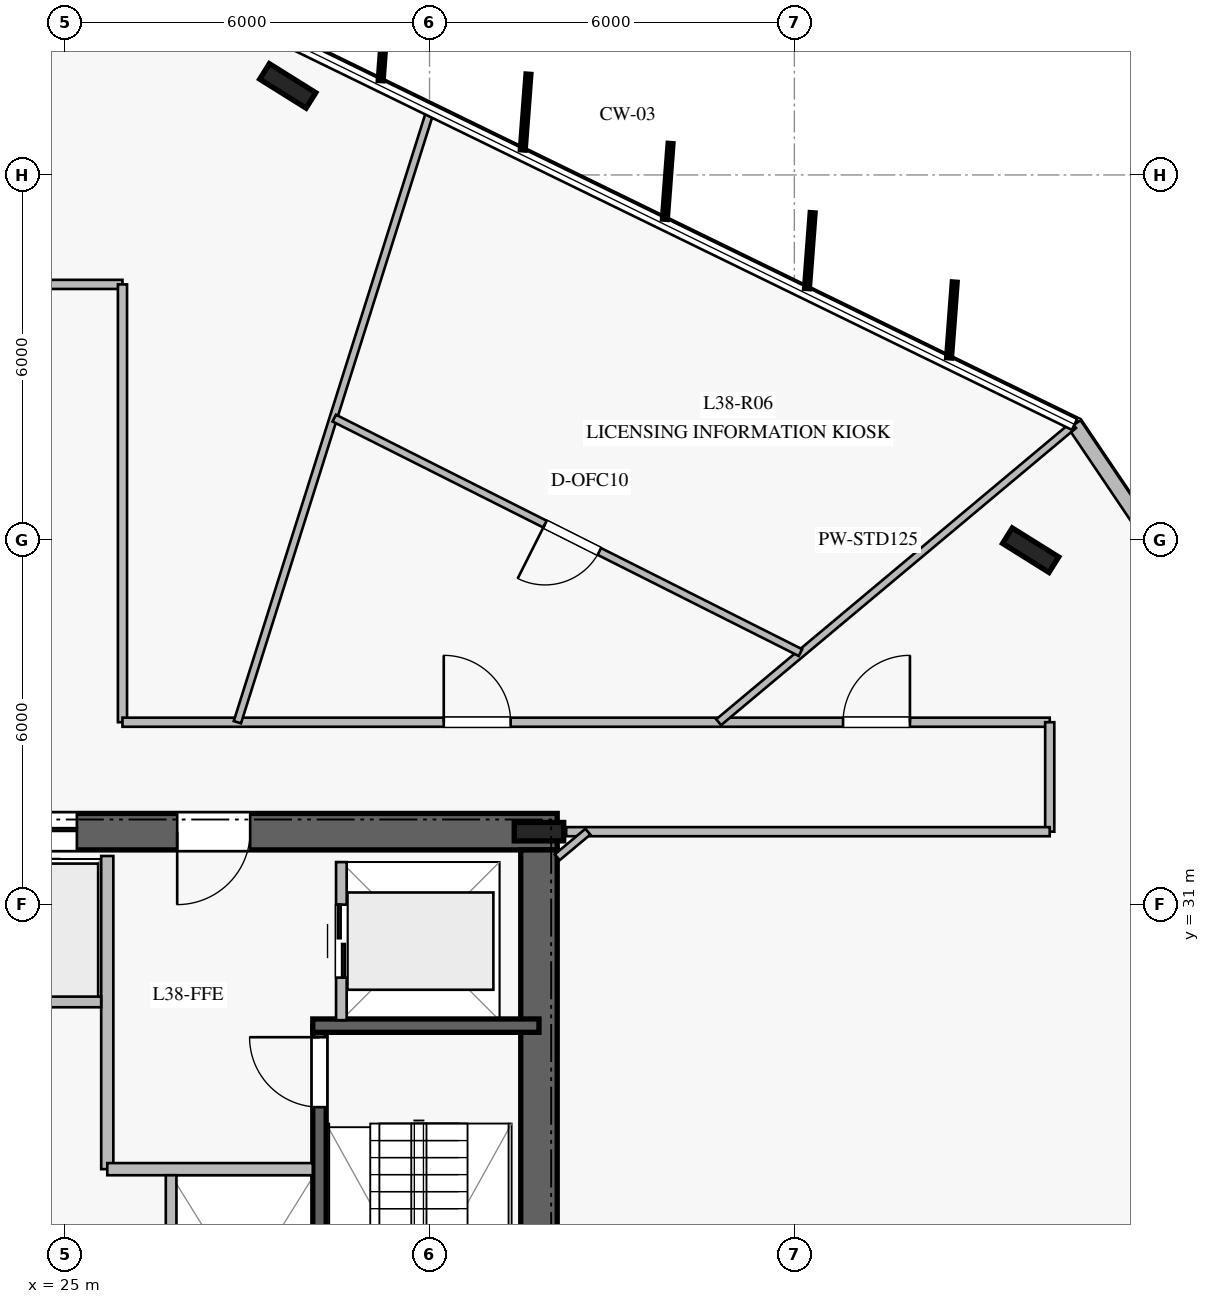
"""IFC4 building model, lengths in metres.
Left out: names, types, materials, properties, quantities, classifications, styles, units other than length and angle.
Written with IfcOpenShell. Run it as: python <this file> out.ifc"""

import sys

from ifc_helpers import new_model, si_unit, direction, frame, frame_2d, origin, origin_2d, place, context, subcontext, project, spatial, rectangle, i_section, extrude, element, fill, save


model = new_model("IFC4")
c1 = context("Model", 3, precision=1e-05, world=origin(), true_north=direction((0.0, 1.0)))
c2 = subcontext(c1, "Body", "Model", "MODEL_VIEW")
j1 = project(units=[si_unit("LENGTHUNIT", "METRE"), si_unit("PLANEANGLEUNIT", "RADIAN")], contexts=[c1])
p1 = place(None, origin())
s1 = spatial("IfcSite", under=j1, at=p1, CompositionType="ELEMENT")
p2 = place(p1, origin())
s2 = spatial("IfcBuilding", under=s1, at=p2, CompositionType="ELEMENT")
p3 = place(p2, frame((0.0, 0.0, 158.4)))
s3 = spatial("IfcBuildingStorey", under=s2, at=p3, CompositionType="ELEMENT", Elevation=158.4)
p4 = place(p3, frame((33.1, 32.2, 0.0), z_axis=(0.0, 0.0, 1.0), x_axis=(-1.0, 0.0, 0.0)))
e1 = element("IfcWall", 1, at=p4, inside=s3, PredefinedType="SHEAR", context=c2, shape_type="SweptSolid", body=[
    extrude(rectangle(XDim=16.2, YDim=0.6, at=frame_2d((8.1, 0.0))), origin(), (0.0, 0.0, 1.0), 3.76),
])
p5 = place(p4, frame((5.05, 0.0, 0.0)))
e2 = element("IfcOpeningElement", 2, at=p5, cuts=e1, PredefinedType="OPENING", context=c2, shape_type="SweptSolid", body=[
    extrude(rectangle(XDim=1.2, YDim=2.25, at=frame_2d((0.6, 1.125))), frame((0.0, 0.31, 0.0), z_axis=(0.0, -1.0, 0.0), x_axis=(1.0, 0.0, 0.0)), (0.0, 0.0, 1.0), 0.62),
])
p6 = place(p4, frame((11.85, 0.0, 0.0)))
e3 = element("IfcOpeningElement", 3, at=p6, cuts=e1, PredefinedType="OPENING", context=c2, shape_type="SweptSolid", body=[
    extrude(rectangle(XDim=1.1, YDim=2.2, at=frame_2d((0.55, 1.1))), frame((0.0, 0.31, 0.0), z_axis=(0.0, -1.0, 0.0), x_axis=(1.0, 0.0, 0.0)), (0.0, 0.0, 1.0), 0.62),
])
p7 = place(p4, frame((9.875, 0.0, 0.0)))
e4 = element("IfcOpeningElement", 4, at=p7, cuts=e1, PredefinedType="OPENING", context=c2, shape_type="SweptSolid", body=[
    extrude(rectangle(XDim=1.1, YDim=2.2, at=frame_2d((0.55, 1.1))), frame((0.0, 0.31, 0.0), z_axis=(0.0, -1.0, 0.0), x_axis=(1.0, 0.0, 0.0)), (0.0, 0.0, 1.0), 0.62),
])
p8 = place(p4, frame((7.9, 0.0, 0.0)))
e5 = element("IfcOpeningElement", 5, at=p8, cuts=e1, PredefinedType="OPENING", context=c2, shape_type="SweptSolid", body=[
    extrude(rectangle(XDim=1.1, YDim=2.2, at=frame_2d((0.55, 1.1))), frame((0.0, 0.31, 0.0), z_axis=(0.0, -1.0, 0.0), x_axis=(1.0, 0.0, 0.0)), (0.0, 0.0, 1.0), 0.62),
])
p9 = place(p3, frame((32.8, 18.1, 0.0), z_axis=(0.0, 0.0, 1.0), x_axis=(0.0, 1.0, 0.0)))
e6 = element("IfcWall", 6, at=p9, inside=s3, PredefinedType="SHEAR", context=c2, shape_type="SweptSolid", body=[
    extrude(rectangle(XDim=13.8, YDim=0.6, at=frame_2d((6.9, 0.0))), origin(), (0.0, 0.0, 1.0), 3.76),
])
p10 = place(p3, frame((32.8, 32.2, 0.0), z_axis=(0.0, 0.0, 1.0), x_axis=(1.0, 0.0, 0.0)))
e7 = element("IfcColumn", 7, at=p10, inside=s3, PredefinedType="COLUMN", context=c2, shape_type="SweptSolid", body=[
    extrude(i_section(OverallWidth=0.303, OverallDepth=0.814, WebThickness=0.021, FlangeThickness=0.04, at=origin_2d()), origin(), (0.0, 0.0, 1.0), 4.0),
])
p11 = place(p3, frame((29.19, 21.79, 0.0), z_axis=(0.0, 0.0, 1.0), x_axis=(0.0, 1.0, 0.0)))
e8 = element("IfcWall", 8, at=p11, inside=s3, PredefinedType="SOLIDWALL", context=c2, shape_type="SweptSolid", body=[
    extrude(rectangle(XDim=7.22, YDim=0.22, at=frame_2d((3.61, 0.0))), origin(), (0.0, 0.0, 1.0), 3.76),
])
p12 = place(p11, frame((5.88, 0.0, 0.0)))
e9 = element("IfcOpeningElement", 9, at=p12, cuts=e8, PredefinedType="OPENING", context=c2, shape_type="SweptSolid", body=[
    extrude(rectangle(XDim=1.15, YDim=2.2, at=frame_2d((0.575, 1.1))), frame((0.0, 0.12, 0.0), z_axis=(0.0, -1.0, 0.0), x_axis=(1.0, 0.0, 0.0)), (0.0, 0.0, 1.0), 0.24),
])
p13 = place(p3, frame((29.08, 29.01, 0.0), z_axis=(0.0, 0.0, 1.0), x_axis=(1.0, 0.0, 0.0)))
e10 = element("IfcWall", 10, at=p13, inside=s3, PredefinedType="SOLIDWALL", context=c2, shape_type="SweptSolid", body=[
    extrude(rectangle(XDim=3.72, YDim=0.22, at=frame_2d((1.86, 0.0))), origin(), (0.0, 0.0, 1.0), 3.76),
])
for number, where, z_axis, x_axis in (
    (11, (40.886, 36.829, 0.0), (0.0, 0.0, 1.0), (-0.848, 0.53, 0.0)),
    (12, (28.668, 44.464, 0.0), (0.0, 0.0, 1.0), (-0.848, 0.53, 0.0)),
):
    element("IfcColumn", number, at=place(p3, frame(where, z_axis=z_axis, x_axis=x_axis)), inside=s3, PredefinedType="COLUMN", context=c2, shape_type="SweptSolid", body=[
        extrude(i_section(OverallWidth=0.3, OverallDepth=0.9, WebThickness=0.019, FlangeThickness=0.035, at=origin_2d()), origin(), (0.0, 0.0, 1.0), 4.0),
    ])
p14 = place(p3, frame((44.107, 35.192, 0.0), z_axis=(0.0, 0.0, 1.0), x_axis=(-0.559078804203, 0.82911452206, 0.0)))
e13 = element("IfcWall", 13, at=p14, inside=s3, PredefinedType="STANDARD", context=c2, shape_type="SweptSolid", body=[
    extrude(rectangle(XDim=4.47, YDim=0.24, at=frame_2d((2.235, 0.0))), origin(), (0.0, 0.0, 1.0), 3.76),
])
p15 = place(p3, frame((25.7, 26.65, 0.0), z_axis=(0.0, 0.0, 1.0), x_axis=(0.0, 1.0, 0.0)))
e14 = element("IfcWall", 14, at=p15, inside=s3, PredefinedType="PARTITIONING", context=c2, shape_type="SweptSolid", body=[
    extrude(rectangle(XDim=5.15, YDim=0.2, at=frame_2d((2.575, 0.0))), origin(), (0.0, 0.0, 1.0), 3.76),
])
p16 = place(p3, frame((25.7, 26.65, 0.0), z_axis=(0.0, 0.0, 1.0), x_axis=(1.0, 0.0, 0.0)))
e15 = element("IfcWall", 15, at=p16, inside=s3, PredefinedType="PARTITIONING", context=c2, shape_type="SweptSolid", body=[
    extrude(rectangle(XDim=3.38, YDim=0.2, at=frame_2d((1.69, 0.0))), origin(), (0.0, 0.0, 1.0), 3.76),
])
for number, where, z_axis, x_axis in (
    (16, (23.7, 29.4, 0.0), (0.0, 0.0, 1.0), (1.0, 0.0, 0.0)),
    (17, (26.75, 24.65, 0.0), (0.0, 0.0, 1.0), (0.0, 1.0, 0.0)),
):
    element("IfcWall", number, at=place(p3, frame(where, z_axis=z_axis, x_axis=x_axis)), inside=s3, PredefinedType="PARTITIONING", context=c2, shape_type="SweptSolid", body=[
        extrude(rectangle(XDim=1.9, YDim=0.175, at=frame_2d((0.95, 0.0))), origin(), (0.0, 0.0, 1.0), 3.76),
    ])
p17 = place(p3, frame((29.55, 29.1, 0.0), z_axis=(0.0, 0.0, 1.0), x_axis=(0.0, 1.0, 0.0)))
e18 = element("IfcWall", 18, at=p17, inside=s3, PredefinedType="PARTITIONING", context=c2, shape_type="SweptSolid", body=[
    extrude(rectangle(XDim=2.6, YDim=0.175, at=frame_2d((1.3, 0.0))), origin(), (0.0, 0.0, 1.0), 3.76),
])
p18 = place(p17, frame((0.7, 0.0, 0.0)))
e19 = element("IfcOpeningElement", 19, at=p18, cuts=e18, PredefinedType="OPENING", context=c2, shape_type="SweptSolid", body=[
    extrude(rectangle(XDim=1.2, YDim=2.2, at=frame_2d((0.6, 1.1))), frame((0.0, 0.098, 0.0), z_axis=(0.0, -1.0, 0.0), x_axis=(1.0, 0.0, 0.0)), (0.0, 0.0, 1.0), 0.195),
])
p19 = place(p3, frame((24.05, 41.2, 0.0), z_axis=(0.0, 0.0, 1.0), x_axis=(1.0, 0.0, 0.0)))
e20 = element("IfcWall", 20, at=p19, inside=s3, PredefinedType="PARTITIONING", context=c2, shape_type="SweptSolid", body=[
    extrude(rectangle(XDim=1.9, YDim=0.15, at=frame_2d((0.95, 0.0))), origin(), (0.0, 0.0, 1.0), 3.76),
])
p20 = place(p3, frame((25.95, 41.2, 0.0), z_axis=(0.0, 0.0, 1.0), x_axis=(0.0, -1.0, 0.0)))
e21 = element("IfcWall", 21, at=p20, inside=s3, PredefinedType="PARTITIONING", context=c2, shape_type="SweptSolid", body=[
    extrude(rectangle(XDim=7.2, YDim=0.15, at=frame_2d((3.6, 0.0))), origin(), (0.0, 0.0, 1.0), 3.36),
])
p21 = place(p3, frame((25.95, 34.0, 0.0), z_axis=(0.0, 0.0, 1.0), x_axis=(1.0, 0.0, 0.0)))
e22 = element("IfcWall", 22, at=p21, inside=s3, PredefinedType="PARTITIONING", context=c2, shape_type="SweptSolid", body=[
    extrude(rectangle(XDim=15.25, YDim=0.15, at=frame_2d((7.625, 0.0))), origin(), (0.0, 0.0, 1.0), 3.21),
])
p22 = place(p21, frame((11.851, 0.0, 0.0)))
e23 = element("IfcOpeningElement", 23, at=p22, cuts=e22, PredefinedType="OPENING", context=c2, shape_type="SweptSolid", body=[
    extrude(rectangle(XDim=1.1, YDim=2.2, at=frame_2d((0.55, 1.1))), frame((0.0, 0.085, 0.0), z_axis=(0.0, -1.0, 0.0), x_axis=(1.0, 0.0, 0.0)), (0.0, 0.0, 1.0), 0.17),
])
p23 = place(p21, frame((5.284, 0.0, 0.0)))
e24 = element("IfcOpeningElement", 24, at=p23, cuts=e22, PredefinedType="OPENING", context=c2, shape_type="SweptSolid", body=[
    extrude(rectangle(XDim=1.1, YDim=2.2, at=frame_2d((0.55, 1.1))), frame((0.0, 0.085, 0.0), z_axis=(0.0, -1.0, 0.0), x_axis=(1.0, 0.0, 0.0)), (0.0, 0.0, 1.0), 0.17),
])
p24 = place(p3, frame((41.2, 34.0, 0.0), z_axis=(0.0, 0.0, 1.0), x_axis=(0.0, -1.0, 0.0)))
e25 = element("IfcWall", 25, at=p24, inside=s3, PredefinedType="PARTITIONING", context=c2, shape_type="SweptSolid", body=[
    extrude(rectangle(XDim=1.8, YDim=0.15, at=frame_2d((0.9, 0.0))), origin(), (0.0, 0.0, 1.0), 3.76),
])
p25 = place(p3, frame((41.2, 32.2, 0.0), z_axis=(0.0, 0.0, 1.0), x_axis=(-1.0, 0.0, 0.0)))
e26 = element("IfcWall", 26, at=p25, inside=s3, PredefinedType="PARTITIONING", context=c2, shape_type="SweptSolid", body=[
    extrude(rectangle(XDim=7.953, YDim=0.15, at=frame_2d((3.977, 0.0))), origin(), (0.0, 0.0, 1.0), 3.21),
])
p26 = place(p3, frame((33.1, 31.779, 0.0), z_axis=(0.0, 0.0, 1.0), x_axis=(0.76748927859, 0.641061781148, 0.0)))
e27 = element("IfcWall", 27, at=p26, inside=s3, PredefinedType="PARTITIONING", context=c2, shape_type="SweptSolid", body=[
    extrude(rectangle(XDim=0.656, YDim=0.125, at=frame_2d((0.328, 0.0))), origin(), (0.0, 0.0, 1.0), 3.21),
])
p27 = place(p3, frame((35.755, 34.0, 0.0), z_axis=(0.0, 0.0, 1.0), x_axis=(0.766871091206, 0.641801160386, 0.0)))
e28 = element("IfcWall", 28, at=p27, inside=s3, PredefinedType="PARTITIONING", context=c2, shape_type="SweptSolid", body=[
    extrude(rectangle(XDim=7.613, YDim=0.125, at=frame_2d((3.807, 0.0))), origin(), (0.0, 0.0, 1.0), 3.16),
])
p28 = place(p3, frame((27.84, 34.0, 0.0), z_axis=(0.0, 0.0, 1.0), x_axis=(0.300858550785, 0.953668775005, 0.0)))
e29 = element("IfcWall", 29, at=p28, inside=s3, PredefinedType="PARTITIONING", context=c2, shape_type="SweptSolid", body=[
    extrude(rectangle(XDim=10.536, YDim=0.125, at=frame_2d((5.268, 0.0))), origin(), (0.0, 0.0, 1.0), 3.16),
])
p29 = place(p3, frame((37.1, 35.145, 0.0), z_axis=(0.0, 0.0, 1.0), x_axis=(-0.893377857621, 0.449306135628, 0.0)))
e30 = element("IfcWall", 30, at=p29, inside=s3, PredefinedType="PARTITIONING", context=c2, shape_type="SweptSolid", body=[
    extrude(rectangle(XDim=8.582, YDim=0.125, at=frame_2d((4.291, 0.0))), origin(), (0.0, 0.0, 1.0), 3.21),
])
p30 = place(p29, frame((3.702, 0.0, 0.0)))
e31 = element("IfcOpeningElement", 31, at=p30, cuts=e30, PredefinedType="OPENING", context=c2, shape_type="SweptSolid", body=[
    extrude(rectangle(XDim=1.0, YDim=2.15, at=frame_2d((0.5, 1.075))), frame((0.0, 0.073, 0.0), z_axis=(0.0, -1.0, 0.0), x_axis=(1.0, 0.0, 0.0)), (0.0, 0.0, 1.0), 0.145),
])
p31 = place(p12, origin())
e32 = element("IfcDoor", 32, at=p31, inside=s3, OperationType="SINGLE_SWING_RIGHT", PredefinedType="DOOR", context=c2, shape_type="SweptSolid", body=[
    extrude(rectangle(XDim=1.15, YDim=2.2, at=frame_2d((0.575, 1.1))), frame((0.0, 0.025, 0.0), z_axis=(0.0, -1.0, 0.0), x_axis=(1.0, 0.0, 0.0)), (0.0, 0.0, 1.0), 0.05),
])
fill(e9, e32)
p32 = place(p5, origin())
e33 = element("IfcDoor", 33, at=p32, inside=s3, OperationType="SINGLE_SWING_RIGHT", PredefinedType="DOOR", context=c2, shape_type="SweptSolid", body=[
    extrude(rectangle(XDim=1.2, YDim=2.25, at=frame_2d((0.6, 1.125))), frame((0.0, 0.025, 0.0), z_axis=(0.0, -1.0, 0.0), x_axis=(1.0, 0.0, 0.0)), (0.0, 0.0, 1.0), 0.05),
])
fill(e2, e33)
p33 = place(p8, origin())
e34 = element("IfcDoor", 34, at=p33, inside=s3, OperationType="DOUBLE_DOOR_SLIDING", PredefinedType="DOOR", context=c2, shape_type="SweptSolid", body=[
    extrude(rectangle(XDim=1.1, YDim=2.2, at=frame_2d((0.55, 1.1))), frame((0.0, 0.025, 0.0), z_axis=(0.0, -1.0, 0.0), x_axis=(1.0, 0.0, 0.0)), (0.0, 0.0, 1.0), 0.05),
])
fill(e5, e34)
p34 = place(p18, origin())
e35 = element("IfcDoor", 35, at=p34, inside=s3, OperationType="DOUBLE_DOOR_SLIDING", PredefinedType="DOOR", context=c2, shape_type="SweptSolid", body=[
    extrude(rectangle(XDim=1.2, YDim=2.2, at=frame_2d((0.6, 1.1))), frame((0.0, 0.025, 0.0), z_axis=(0.0, -1.0, 0.0), x_axis=(1.0, 0.0, 0.0)), (0.0, 0.0, 1.0), 0.05),
])
fill(e19, e35)
p35 = place(p22, origin())
e36 = element("IfcDoor", 36, at=p35, inside=s3, OperationType="SINGLE_SWING_RIGHT", PredefinedType="DOOR", context=c2, shape_type="SweptSolid", body=[
    extrude(rectangle(XDim=1.1, YDim=2.2, at=frame_2d((0.55, 1.1))), frame((0.0, 0.025, 0.0), z_axis=(0.0, -1.0, 0.0), x_axis=(1.0, 0.0, 0.0)), (0.0, 0.0, 1.0), 0.05),
])
fill(e23, e36)
p36 = place(p23, origin())
e37 = element("IfcDoor", 37, at=p36, inside=s3, OperationType="SINGLE_SWING_LEFT", PredefinedType="DOOR", context=c2, shape_type="SweptSolid", body=[
    extrude(rectangle(XDim=1.1, YDim=2.2, at=frame_2d((0.55, 1.1))), frame((0.0, 0.025, 0.0), z_axis=(0.0, -1.0, 0.0), x_axis=(1.0, 0.0, 0.0)), (0.0, 0.0, 1.0), 0.05),
])
fill(e24, e37)
p37 = place(p30, origin())
e38 = element("IfcDoor", 38, at=p37, inside=s3, OperationType="SINGLE_SWING_RIGHT", PredefinedType="DOOR", context=c2, shape_type="SweptSolid", body=[
    extrude(rectangle(XDim=1.0, YDim=2.15, at=frame_2d((0.5, 1.075))), frame((0.0, 0.025, 0.0), z_axis=(0.0, -1.0, 0.0), x_axis=(1.0, 0.0, 0.0)), (0.0, 0.0, 1.0), 0.05),
])
fill(e31, e38)
save(model, sys.argv[1])
